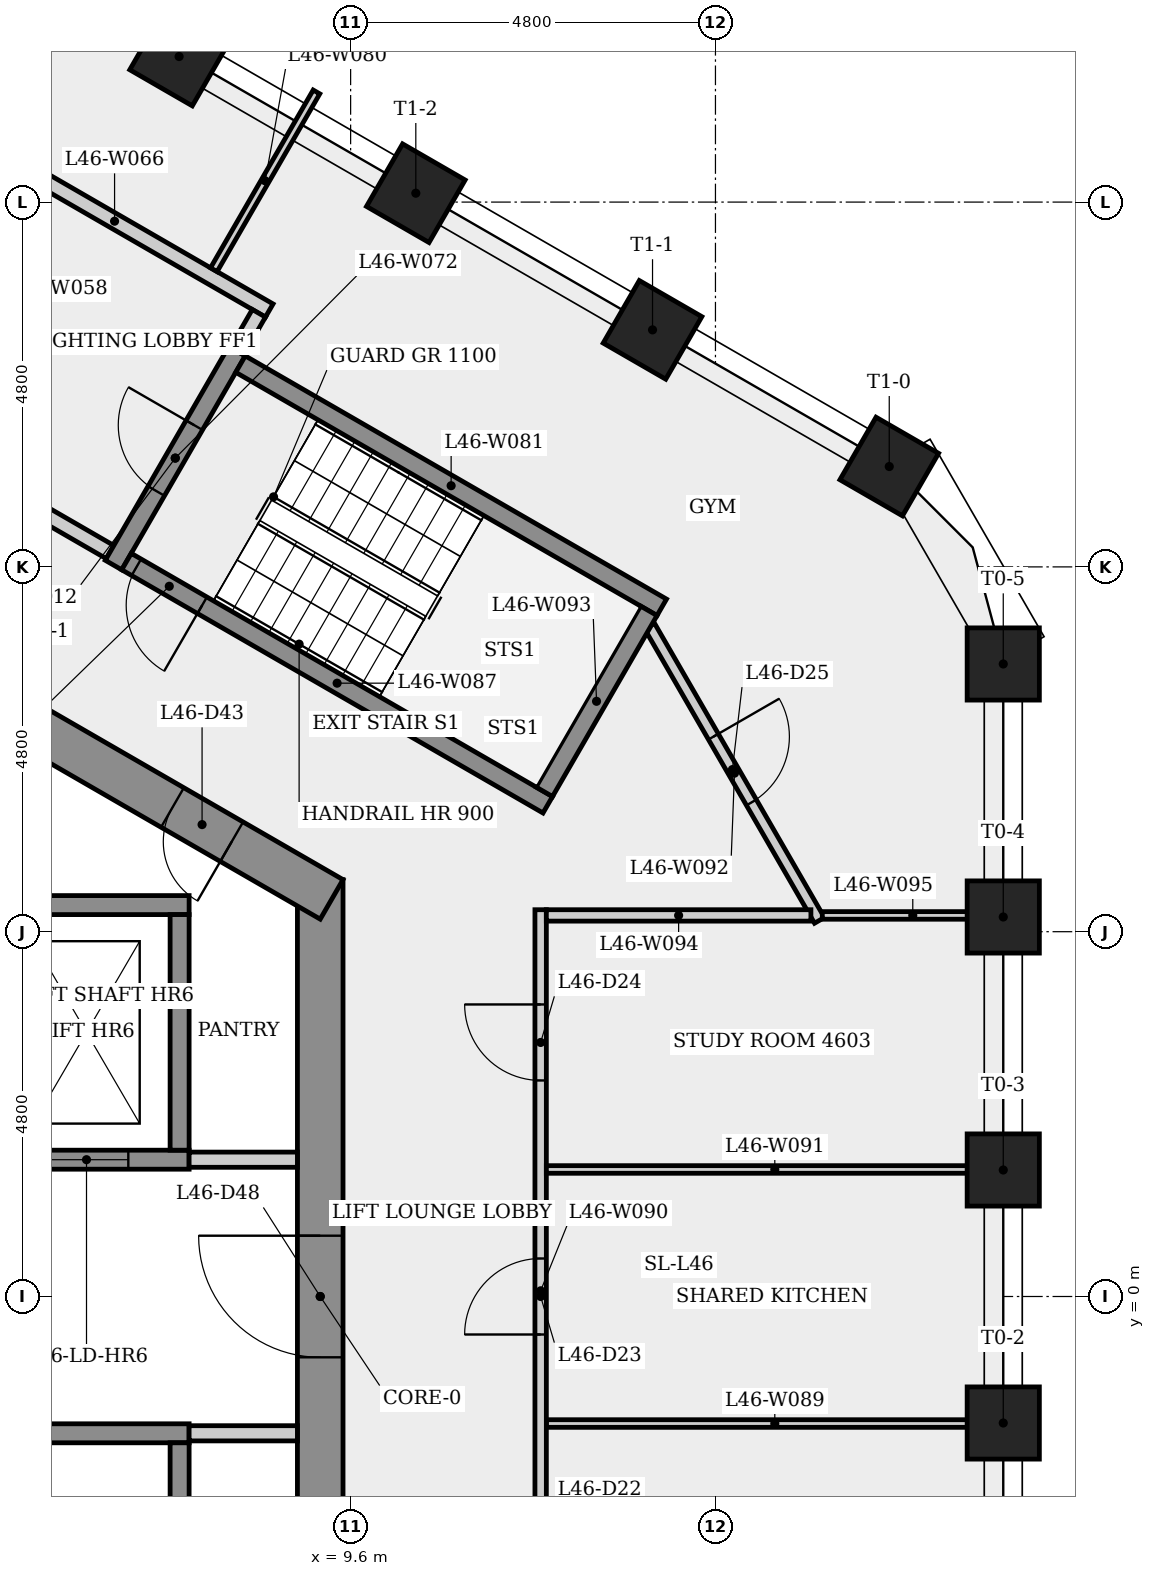
"""IFC4 building model, lengths in metres.
Left out: names, types, materials, properties, quantities, classifications, styles, units other than length and angle.
Written with IfcOpenShell. Run it as: python <this file> out.ifc"""

import sys

from ifc_helpers import new_model, si_unit, direction, frame, frame_2d, origin, origin_2d, place, context, subcontext, project, spatial, rectangle, extrude, element, fill, save


model = new_model("IFC4")
c1 = context("Model", 3, precision=1e-05, world=origin(), true_north=direction((0.0, 1.0)))
c2 = subcontext(c1, "Body", "Model", "MODEL_VIEW")
j1 = project(units=[si_unit("LENGTHUNIT", "METRE"), si_unit("PLANEANGLEUNIT", "RADIAN")], contexts=[c1])
p1 = place(None, origin())
s1 = spatial("IfcSite", under=j1, at=p1, CompositionType="ELEMENT")
p2 = place(p1, origin())
s2 = spatial("IfcBuilding", under=s1, at=p2, CompositionType="ELEMENT")
p3 = place(p2, frame((0.0, 0.0, 173.1)))
s3 = spatial("IfcBuildingStorey", under=s2, at=p3, CompositionType="ELEMENT", Elevation=173.1)
p4 = place(p3, frame((9.2, -5.485, 0.0), z_axis=(0.0, 0.0, 1.0), x_axis=(0.0, 1.0, 0.0)))
e1 = element("IfcWall", 1, at=p4, inside=s3, PredefinedType="SHEAR", context=c2, shape_type="SweptSolid", body=[
    extrude(rectangle(XDim=10.97, YDim=0.6, at=frame_2d((5.485, 0.0))), origin(), (0.0, 0.0, 1.0), 3.4),
])
p5 = place(p4, frame((4.685, 0.0, 0.0)))
e2 = element("IfcOpeningElement", 2, at=p5, cuts=e1, PredefinedType="OPENING", context=c2, shape_type="SweptSolid", body=[
    extrude(rectangle(XDim=1.6, YDim=2.1, at=frame_2d((0.8, 1.05))), frame((0.0, 0.31, 0.0), z_axis=(0.0, -1.0, 0.0), x_axis=(1.0, 0.0, 0.0)), (0.0, 0.0, 1.0), 0.62),
])
p6 = place(p3, frame((9.35, 5.225, 0.0), z_axis=(0.0, 0.0, 1.0), x_axis=(-0.866023993627, 0.500002442456, 0.0)))
e3 = element("IfcWall", 3, at=p6, inside=s3, PredefinedType="SHEAR", context=c2, shape_type="SweptSolid", body=[
    extrude(rectangle(XDim=10.97, YDim=0.6, at=frame_2d((5.485, 0.0))), origin(), (0.0, 0.0, 1.0), 3.4),
])
p7 = place(p6, frame((8.325, 0.0, 0.0)))
e4 = element("IfcOpeningElement", 4, at=p7, cuts=e3, PredefinedType="OPENING", context=c2, shape_type="SweptSolid", body=[
    extrude(rectangle(XDim=0.9, YDim=2.1, at=frame_2d((0.45, 1.05))), frame((0.0, 0.31, 0.0), z_axis=(0.0, -1.0, 0.0), x_axis=(1.0, 0.0, 0.0)), (0.0, 0.0, 1.0), 0.62),
])
p8 = place(p6, frame((1.518, 0.0, 0.0)))
e5 = element("IfcOpeningElement", 5, at=p8, cuts=e3, PredefinedType="OPENING", context=c2, shape_type="SweptSolid", body=[
    extrude(rectangle(XDim=0.9, YDim=2.1, at=frame_2d((0.45, 1.05))), frame((0.0, 0.31, 0.0), z_axis=(0.0, -1.0, 0.0), x_axis=(1.0, 0.0, 0.0)), (0.0, 0.0, 1.0), 0.62),
])
for number, where, z_axis, x_axis in (
    (6, (18.187, -1.665, 0.0), (0.0, 0.0, 1.0), (1.0, 0.0, 0.0)),
    (7, (18.187, 1.665, 0.0), (0.0, 0.0, 1.0), (1.0, 0.0, 0.0)),
    (8, (18.187, 4.993, 0.0), (0.0, 0.0, 1.0), (1.0, 0.0, 0.0)),
    (9, (18.187, 8.323, 0.0), (0.0, 0.0, 1.0), (1.0, 0.0, 0.0)),
    (10, (16.687, 10.921, 0.0), (0.0, 0.0, 1.0), (0.5, 0.866, 0.0)),
    (11, (13.572, 12.719, 0.0), (0.0, 0.0, 1.0), (0.5, 0.866, 0.0)),
    (12, (10.458, 14.517, 0.0), (0.0, 0.0, 1.0), (0.5, 0.866, 0.0)),
    (13, (7.343, 16.315, 0.0), (0.0, 0.0, 1.0), (0.5, 0.866, 0.0)),
):
    element("IfcColumn", number, at=place(p3, frame(where, z_axis=z_axis, x_axis=x_axis)), inside=s3, PredefinedType="COLUMN", context=c2, shape_type="SweptSolid", body=[
        extrude(rectangle(XDim=0.95, YDim=0.95, at=origin_2d()), origin(), (0.0, 0.0, 1.0), 3.4),
    ])
p9 = place(p3, frame((-7.475, 1.8, 0.0), z_axis=(0.0, 0.0, 1.0), x_axis=(1.0, 0.0, 0.0)))
e14 = element("IfcWall", 14, at=p9, inside=s3, PredefinedType="SHEAR", context=c2, shape_type="SweptSolid", body=[
    extrude(rectangle(XDim=14.95, YDim=0.25, at=frame_2d((7.475, 0.0))), origin(), (0.0, 0.0, 1.0), 3.05),
])
p10 = place(p9, frame((0.8, 0.0, 0.0)))
e15 = element("IfcOpeningElement", 15, at=p10, cuts=e14, PredefinedType="OPENING", context=c2, shape_type="SweptSolid", body=[
    extrude(rectangle(XDim=1.1, YDim=2.1, at=frame_2d((0.55, 1.05))), frame((0.0, 0.135, 0.0), z_axis=(0.0, -1.0, 0.0), x_axis=(1.0, 0.0, 0.0)), (0.0, 0.0, 1.0), 0.27),
])
p11 = place(p9, frame((3.25, 0.0, 0.0)))
e16 = element("IfcOpeningElement", 16, at=p11, cuts=e14, PredefinedType="OPENING", context=c2, shape_type="SweptSolid", body=[
    extrude(rectangle(XDim=1.1, YDim=2.1, at=frame_2d((0.55, 1.05))), frame((0.0, 0.135, 0.0), z_axis=(0.0, -1.0, 0.0), x_axis=(1.0, 0.0, 0.0)), (0.0, 0.0, 1.0), 0.27),
])
p12 = place(p9, frame((5.7, 0.0, 0.0)))
e17 = element("IfcOpeningElement", 17, at=p12, cuts=e14, PredefinedType="OPENING", context=c2, shape_type="SweptSolid", body=[
    extrude(rectangle(XDim=1.1, YDim=2.1, at=frame_2d((0.55, 1.05))), frame((0.0, 0.135, 0.0), z_axis=(0.0, -1.0, 0.0), x_axis=(1.0, 0.0, 0.0)), (0.0, 0.0, 1.0), 0.27),
])
p13 = place(p9, frame((8.15, 0.0, 0.0)))
e18 = element("IfcOpeningElement", 18, at=p13, cuts=e14, PredefinedType="OPENING", context=c2, shape_type="SweptSolid", body=[
    extrude(rectangle(XDim=1.1, YDim=2.1, at=frame_2d((0.55, 1.05))), frame((0.0, 0.135, 0.0), z_axis=(0.0, -1.0, 0.0), x_axis=(1.0, 0.0, 0.0)), (0.0, 0.0, 1.0), 0.27),
])
p14 = place(p9, frame((10.6, 0.0, 0.0)))
e19 = element("IfcOpeningElement", 19, at=p14, cuts=e14, PredefinedType="OPENING", context=c2, shape_type="SweptSolid", body=[
    extrude(rectangle(XDim=1.1, YDim=2.1, at=frame_2d((0.55, 1.05))), frame((0.0, 0.135, 0.0), z_axis=(0.0, -1.0, 0.0), x_axis=(1.0, 0.0, 0.0)), (0.0, 0.0, 1.0), 0.27),
])
p15 = place(p9, frame((13.05, 0.0, 0.0)))
e20 = element("IfcOpeningElement", 20, at=p15, cuts=e14, PredefinedType="OPENING", context=c2, shape_type="SweptSolid", body=[
    extrude(rectangle(XDim=1.1, YDim=2.1, at=frame_2d((0.55, 1.05))), frame((0.0, 0.135, 0.0), z_axis=(0.0, -1.0, 0.0), x_axis=(1.0, 0.0, 0.0)), (0.0, 0.0, 1.0), 0.27),
])
p16 = place(p3, frame((-7.225, 5.15, 0.0), z_axis=(0.0, 0.0, 1.0), x_axis=(1.0, 0.0, 0.0)))
e21 = element("IfcWall", 21, at=p16, inside=s3, PredefinedType="SHEAR", context=c2, shape_type="SweptSolid", body=[
    extrude(rectangle(XDim=14.7, YDim=0.25, at=frame_2d((7.35, 0.0))), origin(), (0.0, 0.0, 1.0), 3.05),
])
p17 = place(p3, frame((4.459, 15.323, 0.0), z_axis=(0.0, 0.0, 1.0), x_axis=(0.866016039709, -0.500016218704, 0.0)))
e22 = element("IfcWall", 22, at=p17, inside=s3, PredefinedType="PARTITIONING", context=c2, shape_type="SweptSolid", body=[
    extrude(rectangle(XDim=4.7, YDim=0.2, at=frame_2d((2.35, 0.0))), origin(), (0.0, 0.0, 1.0), 3.05),
])
p18 = place(p3, frame((2.575, -1.8, 0.0), z_axis=(0.0, 0.0, 1.0), x_axis=(1.0, 0.0, 0.0)))
e23 = element("IfcWall", 23, at=p18, inside=s3, PredefinedType="SHEAR", context=c2, shape_type="SweptSolid", body=[
    extrude(rectangle(XDim=4.9, YDim=0.25, at=frame_2d((2.45, 0.0))), origin(), (0.0, 0.0, 1.0), 3.05),
])
p19 = place(p18, frame((0.597, 0.0, 0.0)))
e24 = element("IfcOpeningElement", 24, at=p19, cuts=e23, PredefinedType="OPENING", context=c2, shape_type="SweptSolid", body=[
    extrude(rectangle(XDim=1.1, YDim=2.1, at=frame_2d((0.55, 1.05))), frame((0.0, 0.135, 0.0), z_axis=(0.0, -1.0, 0.0), x_axis=(1.0, 0.0, 0.0)), (0.0, 0.0, 1.0), 0.27),
])
p20 = place(p3, frame((6.435, 9.795, 0.0), z_axis=(0.0, 0.0, 1.0), x_axis=(-0.866012907634, 0.500021643343, 0.0)))
e25 = element("IfcWall", 25, at=p20, inside=s3, PredefinedType="PARTITIONING", context=c2, shape_type="SweptSolid", body=[
    extrude(rectangle(XDim=4.45, YDim=0.2, at=frame_2d((2.225, 0.0))), origin(), (0.0, 0.0, 1.0), 3.05),
])
p21 = place(p20, frame((1.675, 0.0, 0.0)))
e26 = element("IfcOpeningElement", 26, at=p21, cuts=e25, PredefinedType="OPENING", context=c2, shape_type="SweptSolid", body=[
    extrude(rectangle(XDim=1.1, YDim=2.1, at=frame_2d((0.55, 1.05))), frame((0.0, 0.11, 0.0), z_axis=(0.0, -1.0, 0.0), x_axis=(1.0, 0.0, 0.0)), (0.0, 0.0, 1.0), 0.22),
])
p22 = place(p3, frame((6.48, 9.624, 0.0), z_axis=(0.0, 0.0, 1.0), x_axis=(0.500017246033, 0.866015446554, 0.0)))
e27 = element("IfcWall", 27, at=p22, inside=s3, PredefinedType="SHEAR", context=c2, shape_type="SweptSolid", body=[
    extrude(rectangle(XDim=3.25, YDim=0.25, at=frame_2d((1.625, 0.0))), origin(), (0.0, 0.0, 1.0), 3.05),
])
p23 = place(p22, frame((1.125, 0.0, 0.0)))
e28 = element("IfcOpeningElement", 28, at=p23, cuts=e27, PredefinedType="OPENING", context=c2, shape_type="SweptSolid", body=[
    extrude(rectangle(XDim=1.0, YDim=2.1, at=frame_2d((0.5, 1.05))), frame((0.0, 0.135, 0.0), z_axis=(0.0, -1.0, 0.0), x_axis=(1.0, 0.0, 0.0)), (0.0, 0.0, 1.0), 0.27),
])
p24 = place(p3, frame((7.475, 1.8, 0.0), z_axis=(0.0, 0.0, 1.0), x_axis=(1.0, 0.0, 0.0)))
e29 = element("IfcWall", 29, at=p24, inside=s3, PredefinedType="PARTITIONING", context=c2, shape_type="SweptSolid", body=[
    extrude(rectangle(XDim=1.425, YDim=0.2, at=frame_2d((0.712, 0.0))), origin(), (0.0, 0.0, 1.0), 3.05),
])
for number, where, z_axis, x_axis in (
    (30, (7.35, -1.925, 0.0), (0.0, 0.0, 1.0), (0.0, -1.0, 0.0)),
    (31, (7.35, 5.025, 0.0), (0.0, 0.0, 1.0), (0.0, -1.0, 0.0)),
):
    element("IfcWall", number, at=place(p3, frame(where, z_axis=z_axis, x_axis=x_axis)), inside=s3, PredefinedType="SHEAR", context=c2, shape_type="SweptSolid", body=[
        extrude(rectangle(XDim=3.1, YDim=0.25, at=frame_2d((1.55, 0.0))), origin(), (0.0, 0.0, 1.0), 3.4),
    ])
p25 = place(p3, frame((7.8, 13.51, 0.0), z_axis=(0.0, 0.0, 1.0), x_axis=(0.499949324397, 0.866054659381, 0.0)))
e32 = element("IfcWall", 32, at=p25, inside=s3, PredefinedType="PARTITIONING", context=c2, shape_type="SweptSolid", body=[
    extrude(rectangle(XDim=2.701, YDim=0.1, at=frame_2d((1.351, 0.0))), origin(), (0.0, 0.0, 1.0), 3.05),
])
p26 = place(p3, frame((8.151, 12.268, 0.0), z_axis=(0.0, 0.0, 1.0), x_axis=(0.866025499775, -0.499999833739, 0.0)))
e33 = element("IfcWall", 33, at=p26, inside=s3, PredefinedType="SHEAR", context=c2, shape_type="SweptSolid", body=[
    extrude(rectangle(XDim=6.4, YDim=0.25, at=frame_2d((3.2, 0.0))), origin(), (0.0, 0.0, 1.0), 3.05),
])
p27 = place(p3, frame((8.393, 12.937, 0.0), z_axis=(0.0, 0.0, 1.0), x_axis=(-0.500065409566, -0.86598763626, 0.0)))
e34 = element("IfcWall", 34, at=p27, inside=s3, PredefinedType="PARTITIONING", context=c2, shape_type="SweptSolid", body=[
    extrude(rectangle(XDim=0.575, YDim=0.2, at=frame_2d((0.288, 0.0))), origin(), (0.0, 0.0, 1.0), 3.05),
])
p28 = place(p3, frame((8.9, -1.8, 0.0), z_axis=(0.0, 0.0, 1.0), x_axis=(-1.0, 0.0, 0.0)))
e35 = element("IfcWall", 35, at=p28, inside=s3, PredefinedType="PARTITIONING", context=c2, shape_type="SweptSolid", body=[
    extrude(rectangle(XDim=1.425, YDim=0.2, at=frame_2d((0.712, 0.0))), origin(), (0.0, 0.0, 1.0), 3.05),
])
p29 = place(p3, frame((12.194, 6.47, 0.0), z_axis=(0.0, 0.0, 1.0), x_axis=(-0.866025499775, 0.499999833739, 0.0)))
e36 = element("IfcWall", 36, at=p29, inside=s3, PredefinedType="SHEAR", context=c2, shape_type="SweptSolid", body=[
    extrude(rectangle(XDim=6.4, YDim=0.25, at=frame_2d((3.2, 0.0))), origin(), (0.0, 0.0, 1.0), 3.05),
])
p30 = place(p29, frame((5.25, 0.0, 0.0)))
e37 = element("IfcOpeningElement", 37, at=p30, cuts=e36, PredefinedType="OPENING", context=c2, shape_type="SweptSolid", body=[
    extrude(rectangle(XDim=1.0, YDim=2.1, at=frame_2d((0.5, 1.05))), frame((0.0, 0.135, 0.0), z_axis=(0.0, -1.0, 0.0), x_axis=(1.0, 0.0, 0.0)), (0.0, 0.0, 1.0), 0.27),
])
p31 = place(p3, frame((12.175, -1.671, 0.0), z_axis=(0.0, 0.0, 1.0), x_axis=(1.0, 0.0, 0.0)))
e38 = element("IfcWall", 38, at=p31, inside=s3, PredefinedType="PARTITIONING", context=c2, shape_type="SweptSolid", body=[
    extrude(rectangle(XDim=6.011, YDim=0.1, at=frame_2d((3.006, 0.0))), origin(), (0.0, 0.0, 1.0), 3.05),
])
p32 = place(p3, frame((12.1, -4.939, 0.0), z_axis=(0.0, 0.0, 1.0), x_axis=(0.0, 1.0, 0.0)))
e39 = element("IfcWall", 39, at=p32, inside=s3, PredefinedType="PARTITIONING", context=c2, shape_type="SweptSolid", body=[
    extrude(rectangle(XDim=10.028, YDim=0.15, at=frame_2d((5.014, 0.0))), origin(), (0.0, 0.0, 1.0), 3.05),
])
p33 = place(p32, frame((1.119, 0.0, 0.0)))
e40 = element("IfcOpeningElement", 40, at=p33, cuts=e39, PredefinedType="OPENING", context=c2, shape_type="SweptSolid", body=[
    extrude(rectangle(XDim=1.0, YDim=2.1, at=frame_2d((0.5, 1.05))), frame((0.0, 0.085, 0.0), z_axis=(0.0, -1.0, 0.0), x_axis=(1.0, 0.0, 0.0)), (0.0, 0.0, 1.0), 0.17),
])
p34 = place(p32, frame((4.439, 0.0, 0.0)))
e41 = element("IfcOpeningElement", 41, at=p34, cuts=e39, PredefinedType="OPENING", context=c2, shape_type="SweptSolid", body=[
    extrude(rectangle(XDim=1.0, YDim=2.1, at=frame_2d((0.5, 1.05))), frame((0.0, 0.085, 0.0), z_axis=(0.0, -1.0, 0.0), x_axis=(1.0, 0.0, 0.0)), (0.0, 0.0, 1.0), 0.17),
])
p35 = place(p32, frame((7.782, 0.0, 0.0)))
e42 = element("IfcOpeningElement", 42, at=p35, cuts=e39, PredefinedType="OPENING", context=c2, shape_type="SweptSolid", body=[
    extrude(rectangle(XDim=1.0, YDim=2.1, at=frame_2d((0.5, 1.05))), frame((0.0, 0.085, 0.0), z_axis=(0.0, -1.0, 0.0), x_axis=(1.0, 0.0, 0.0)), (0.0, 0.0, 1.0), 0.17),
])
p36 = place(p3, frame((12.175, 1.671, 0.0), z_axis=(0.0, 0.0, 1.0), x_axis=(1.0, 0.0, 0.0)))
e43 = element("IfcWall", 43, at=p36, inside=s3, PredefinedType="PARTITIONING", context=c2, shape_type="SweptSolid", body=[
    extrude(rectangle(XDim=6.011, YDim=0.1, at=frame_2d((3.006, 0.0))), origin(), (0.0, 0.0, 1.0), 3.05),
])
p37 = place(p3, frame((13.532, 8.822, 0.0), z_axis=(0.0, 0.0, 1.0), x_axis=(0.500020172634, -0.866013756796, 0.0)))
e44 = element("IfcWall", 44, at=p37, inside=s3, PredefinedType="PARTITIONING", context=c2, shape_type="SweptSolid", body=[
    extrude(rectangle(XDim=4.472, YDim=0.15, at=frame_2d((2.236, 0.0))), origin(), (0.0, 0.0, 1.0), 3.05),
])
p38 = place(p37, frame((1.681, 0.0, 0.0)))
e45 = element("IfcOpeningElement", 45, at=p38, cuts=e44, PredefinedType="OPENING", context=c2, shape_type="SweptSolid", body=[
    extrude(rectangle(XDim=1.0, YDim=2.1, at=frame_2d((0.5, 1.05))), frame((0.0, 0.085, 0.0), z_axis=(0.0, -1.0, 0.0), x_axis=(1.0, 0.0, 0.0)), (0.0, 0.0, 1.0), 0.17),
])
p39 = place(p3, frame((12.148, 6.641, 0.0), z_axis=(0.0, 0.0, 1.0), x_axis=(0.500034990121, 0.866005201286, 0.0)))
e46 = element("IfcWall", 46, at=p39, inside=s3, PredefinedType="SHEAR", context=c2, shape_type="SweptSolid", body=[
    extrude(rectangle(XDim=2.75, YDim=0.25, at=frame_2d((1.375, 0.0))), origin(), (0.0, 0.0, 1.0), 3.05),
])
p40 = place(p3, frame((15.656, 5.014, 0.0), z_axis=(0.0, 0.0, 1.0), x_axis=(-1.0, 0.0, 0.0)))
e47 = element("IfcWall", 47, at=p40, inside=s3, PredefinedType="PARTITIONING", context=c2, shape_type="SweptSolid", body=[
    extrude(rectangle(XDim=3.481, YDim=0.15, at=frame_2d((1.74, 0.0))), origin(), (0.0, 0.0, 1.0), 3.05),
])
p41 = place(p3, frame((15.806, 5.014, 0.0), z_axis=(0.0, 0.0, 1.0), x_axis=(1.0, 0.0, 0.0)))
e48 = element("IfcWall", 48, at=p41, inside=s3, PredefinedType="PARTITIONING", context=c2, shape_type="SweptSolid", body=[
    extrude(rectangle(XDim=2.381, YDim=0.1, at=frame_2d((1.19, 0.0))), origin(), (0.0, 0.0, 1.0), 3.05),
])
p42 = place(p15, origin())
e49 = element("IfcDoor", 49, at=p42, inside=s3, OperationType="SLIDING_TO_LEFT", PredefinedType="DOOR", context=c2, shape_type="SweptSolid", body=[
    extrude(rectangle(XDim=1.1, YDim=2.1, at=frame_2d((0.55, 1.05))), frame((0.0, 0.025, 0.0), z_axis=(0.0, -1.0, 0.0), x_axis=(1.0, 0.0, 0.0)), (0.0, 0.0, 1.0), 0.05),
])
fill(e20, e49)
p43 = place(p30, origin())
e50 = element("IfcDoor", 50, at=p43, inside=s3, OperationType="SINGLE_SWING_LEFT", PredefinedType="DOOR", context=c2, shape_type="SweptSolid", body=[
    extrude(rectangle(XDim=1.0, YDim=2.1, at=frame_2d((0.5, 1.05))), frame((0.0, 0.025, 0.0), z_axis=(0.0, -1.0, 0.0), x_axis=(1.0, 0.0, 0.0)), (0.0, 0.0, 1.0), 0.05),
])
fill(e37, e50)
p44 = place(p23, origin())
e51 = element("IfcDoor", 51, at=p44, inside=s3, OperationType="SINGLE_SWING_RIGHT", PredefinedType="DOOR", context=c2, shape_type="SweptSolid", body=[
    extrude(rectangle(XDim=1.0, YDim=2.1, at=frame_2d((0.5, 1.05))), frame((0.0, 0.025, 0.0), z_axis=(0.0, -1.0, 0.0), x_axis=(1.0, 0.0, 0.0)), (0.0, 0.0, 1.0), 0.05),
])
fill(e28, e51)
p45 = place(p34, origin())
e52 = element("IfcDoor", 52, at=p45, inside=s3, OperationType="SINGLE_SWING_LEFT", PredefinedType="DOOR", context=c2, shape_type="SweptSolid", body=[
    extrude(rectangle(XDim=1.0, YDim=2.1, at=frame_2d((0.5, 1.05))), frame((0.0, 0.025, 0.0), z_axis=(0.0, -1.0, 0.0), x_axis=(1.0, 0.0, 0.0)), (0.0, 0.0, 1.0), 0.05),
])
fill(e41, e52)
p46 = place(p35, origin())
e53 = element("IfcDoor", 53, at=p46, inside=s3, OperationType="SINGLE_SWING_RIGHT", PredefinedType="DOOR", context=c2, shape_type="SweptSolid", body=[
    extrude(rectangle(XDim=1.0, YDim=2.1, at=frame_2d((0.5, 1.05))), frame((0.0, 0.025, 0.0), z_axis=(0.0, -1.0, 0.0), x_axis=(1.0, 0.0, 0.0)), (0.0, 0.0, 1.0), 0.05),
])
fill(e42, e53)
p47 = place(p38, origin())
e54 = element("IfcDoor", 54, at=p47, inside=s3, OperationType="SINGLE_SWING_LEFT", PredefinedType="DOOR", context=c2, shape_type="SweptSolid", body=[
    extrude(rectangle(XDim=1.0, YDim=2.1, at=frame_2d((0.5, 1.05))), frame((0.0, 0.025, 0.0), z_axis=(0.0, -1.0, 0.0), x_axis=(1.0, 0.0, 0.0)), (0.0, 0.0, 1.0), 0.05),
])
fill(e45, e54)
p48 = place(p8, origin())
e55 = element("IfcDoor", 55, at=p48, inside=s3, OperationType="SINGLE_SWING_LEFT", PredefinedType="DOOR", context=c2, shape_type="SweptSolid", body=[
    extrude(rectangle(XDim=0.9, YDim=2.1, at=frame_2d((0.45, 1.05))), frame((0.0, 0.025, 0.0), z_axis=(0.0, -1.0, 0.0), x_axis=(1.0, 0.0, 0.0)), (0.0, 0.0, 1.0), 0.05),
])
fill(e5, e55)
p49 = place(p5, origin())
e56 = element("IfcDoor", 56, at=p49, inside=s3, OperationType="SINGLE_SWING_RIGHT", PredefinedType="DOOR", context=c2, shape_type="SweptSolid", body=[
    extrude(rectangle(XDim=1.6, YDim=2.1, at=frame_2d((0.8, 1.05))), frame((0.0, 0.025, 0.0), z_axis=(0.0, -1.0, 0.0), x_axis=(1.0, 0.0, 0.0)), (0.0, 0.0, 1.0), 0.05),
])
fill(e2, e56)
save(model, sys.argv[1])
